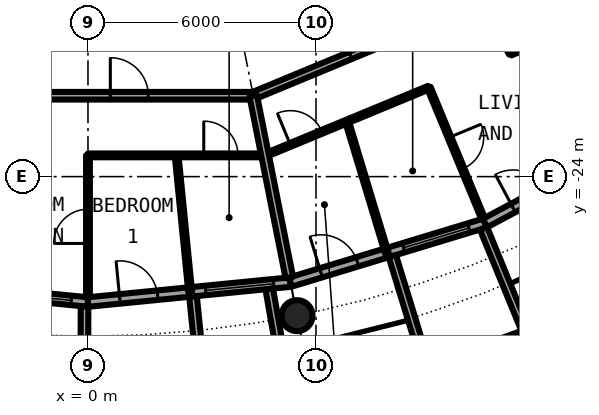
"""IFC4 building model, lengths in metres.
Left out: names, types, materials, properties, quantities, classifications, styles, units other than length and angle.
Written with IfcOpenShell. Run it as: python <this file> out.ifc"""

import sys

from ifc_helpers import new_model, si_unit, direction, frame, frame_2d, origin, origin_2d, place, context, subcontext, project, spatial, rectangle, circle, hollow_circle, extrude, element, fill, save


model = new_model("IFC4")
c1 = context("Model", 3, precision=1e-05, world=origin(), true_north=direction((0.0, 1.0)))
c2 = subcontext(c1, "Body", "Model", "MODEL_VIEW")
j1 = project(units=[si_unit("LENGTHUNIT", "METRE"), si_unit("PLANEANGLEUNIT", "RADIAN")], contexts=[c1])
p1 = place(None, origin())
s1 = spatial("IfcSite", under=j1, at=p1, CompositionType="ELEMENT")
p2 = place(p1, origin())
s2 = spatial("IfcBuilding", under=s1, at=p2, CompositionType="ELEMENT")
p3 = place(p2, frame((0.0, 0.0, 170.75)))
s3 = spatial("IfcBuildingStorey", under=s2, at=p3, CompositionType="ELEMENT", Elevation=170.75)
p4 = place(p3, frame((5.501, -27.658, 0.0), z_axis=(0.0, 0.0, 1.0), x_axis=(1.0, 0.0, 0.0)))
e1 = element("IfcColumn", 1, at=p4, inside=s3, PredefinedType="COLUMN", context=c2, shape_type="SweptSolid", body=[
    extrude(hollow_circle(Radius=0.406, WallThickness=0.04, at=origin_2d()), origin(), (0.0, 0.0, 1.0), 3.05),
])
p5 = place(p3, frame((-5.326, -26.775, 0.0), z_axis=(0.0, 0.0, 1.0), x_axis=(0.995173996315, -0.098126026407, 0.0)))
e2 = element("IfcWall", 2, at=p5, inside=s3, PredefinedType="SOLIDWALL", context=c2, shape_type="SweptSolid", body=[
    extrude(rectangle(XDim=5.352, YDim=0.25, at=frame_2d((2.676, 0.0))), origin(), (0.0, 0.0, 1.0), 2.7),
])
p6 = place(p5, frame((0.841, 0.0, 0.0)))
e3 = element("IfcOpeningElement", 3, at=p6, cuts=e2, PredefinedType="OPENING", context=c2, shape_type="SweptSolid", body=[
    extrude(rectangle(XDim=1.0, YDim=2.2, at=frame_2d((0.5, 1.1))), frame((0.0, 0.135, 0.0), z_axis=(0.0, -1.0, 0.0), x_axis=(1.0, 0.0, 0.0)), (0.0, 0.0, 1.0), 0.27),
])
p7 = place(p5, frame((3.111, 0.0, 0.3)))
e4 = element("IfcOpeningElement", 4, at=p7, cuts=e2, PredefinedType="OPENING", context=c2, shape_type="SweptSolid", body=[
    extrude(rectangle(XDim=1.8, YDim=2.1, at=frame_2d((0.9, 1.05))), frame((0.0, 0.135, 0.0), z_axis=(0.0, -1.0, 0.0), x_axis=(1.0, 0.0, 0.0)), (0.0, 0.0, 1.0), 0.27),
])
p8 = place(p3, frame((-0.09, -27.417, -0.03), z_axis=(0.0, 0.0, 1.0), x_axis=(-0.00347308367, -0.999993968827, 0.0)))
e5 = element("IfcWall", 5, at=p8, inside=s3, PredefinedType="SOLIDWALL", context=c2, shape_type="SweptSolid", body=[
    extrude(rectangle(XDim=2.882, YDim=0.2, at=frame_2d((1.441, 0.0))), origin(), (0.0, 0.0, 1.0), 2.73),
])
p9 = place(p3, frame((0.0, -27.3, 0.0), z_axis=(0.0, 0.0, 1.0), x_axis=(0.995173996315, 0.098126026407, 0.0)))
e6 = element("IfcWall", 6, at=p9, inside=s3, PredefinedType="SOLIDWALL", context=c2, shape_type="SweptSolid", body=[
    extrude(rectangle(XDim=5.352, YDim=0.25, at=frame_2d((2.676, 0.0))), origin(), (0.0, 0.0, 1.0), 2.7),
])
p10 = place(p9, frame((0.841, 0.0, 0.0)))
e7 = element("IfcOpeningElement", 7, at=p10, cuts=e6, PredefinedType="OPENING", context=c2, shape_type="SweptSolid", body=[
    extrude(rectangle(XDim=1.0, YDim=2.2, at=frame_2d((0.5, 1.1))), frame((0.0, 0.135, 0.0), z_axis=(0.0, -1.0, 0.0), x_axis=(1.0, 0.0, 0.0)), (0.0, 0.0, 1.0), 0.27),
])
p11 = place(p9, frame((3.111, 0.0, 0.3)))
e8 = element("IfcOpeningElement", 8, at=p11, cuts=e6, PredefinedType="OPENING", context=c2, shape_type="SweptSolid", body=[
    extrude(rectangle(XDim=1.8, YDim=2.1, at=frame_2d((0.9, 1.05))), frame((0.0, 0.135, 0.0), z_axis=(0.0, -1.0, 0.0), x_axis=(1.0, 0.0, 0.0)), (0.0, 0.0, 1.0), 0.27),
])
p12 = place(p3, frame((2.764, -27.153, -0.03), z_axis=(0.0, 0.0, 1.0), x_axis=(0.101505487237, -0.994834979311, 0.0)))
e9 = element("IfcWall", 9, at=p12, inside=s3, PredefinedType="SOLIDWALL", context=c2, shape_type="SweptSolid", body=[
    extrude(rectangle(XDim=3.007, YDim=0.2, at=frame_2d((1.503, 0.0))), origin(), (0.0, 0.0, 1.0), 2.73),
])
p13 = place(p3, frame((4.769, -26.956, -0.03), z_axis=(0.0, 0.0, 1.0), x_axis=(0.174056778901, -0.984735618183, 0.0)))
e10 = element("IfcWall", 10, at=p13, inside=s3, PredefinedType="SOLIDWALL", context=c2, shape_type="SweptSolid", body=[
    extrude(rectangle(XDim=2.925, YDim=0.2, at=frame_2d((1.462, 0.0))), origin(), (0.0, 0.0, 1.0), 2.73),
])
p14 = place(p3, frame((5.326, -26.775, 0.0), z_axis=(0.0, 0.0, 1.0), x_axis=(0.956965678721, 0.290201119486, 0.0)))
e11 = element("IfcWall", 11, at=p14, inside=s3, PredefinedType="SOLIDWALL", context=c2, shape_type="SweptSolid", body=[
    extrude(rectangle(XDim=5.351, YDim=0.25, at=frame_2d((2.676, 0.0))), origin(), (0.0, 0.0, 1.0), 2.7),
])
p15 = place(p14, frame((0.841, 0.0, 0.0)))
e12 = element("IfcOpeningElement", 12, at=p15, cuts=e11, PredefinedType="OPENING", context=c2, shape_type="SweptSolid", body=[
    extrude(rectangle(XDim=1.0, YDim=2.2, at=frame_2d((0.5, 1.1))), frame((0.0, 0.135, 0.0), z_axis=(0.0, -1.0, 0.0), x_axis=(1.0, 0.0, 0.0)), (0.0, 0.0, 1.0), 0.27),
])
p16 = place(p14, frame((3.111, 0.0, 0.3)))
e13 = element("IfcOpeningElement", 13, at=p16, cuts=e11, PredefinedType="OPENING", context=c2, shape_type="SweptSolid", body=[
    extrude(rectangle(XDim=1.8, YDim=2.1, at=frame_2d((0.9, 1.05))), frame((0.0, 0.135, 0.0), z_axis=(0.0, -1.0, 0.0), x_axis=(1.0, 0.0, 0.0)), (0.0, 0.0, 1.0), 0.27),
])
p17 = place(p3, frame((8.82, -29.093, -0.03), z_axis=(0.0, 0.0, 1.0), x_axis=(0.941461077774, 0.337121697664, 0.0)))
e14 = element("IfcWall", 14, at=p17, inside=s3, PredefinedType="SOLIDWALL", context=c2, shape_type="SweptSolid", body=[
    extrude(rectangle(XDim=2.993, YDim=0.2, at=frame_2d((1.497, 0.0))), origin(), (0.0, 0.0, 1.0), 2.73),
])
p18 = place(p17, frame((0.457, 0.0, 0.33)))
e15 = element("IfcOpeningElement", 15, at=p18, cuts=e14, PredefinedType="OPENING", context=c2, shape_type="SweptSolid", body=[
    extrude(circle(Radius=1.04, at=frame_2d((1.04, 1.04))), frame((0.0, 0.11, 0.0), z_axis=(0.0, -1.0, 0.0), x_axis=(1.0, 0.0, 0.0)), (0.0, 0.0, 1.0), 0.22),
])
p19 = place(p3, frame((8.009, -26.092, -0.03), z_axis=(0.0, 0.0, 1.0), x_axis=(0.293406695073, -0.955987715029, 0.0)))
e16 = element("IfcWall", 16, at=p19, inside=s3, PredefinedType="SOLIDWALL", context=c2, shape_type="SweptSolid", body=[
    extrude(rectangle(XDim=3.006, YDim=0.2, at=frame_2d((1.503, 0.0))), origin(), (0.0, 0.0, 1.0), 2.73),
])
p20 = place(p3, frame((10.409, -25.364, -0.03), z_axis=(0.0, 0.0, 1.0), x_axis=(0.379509886562, -0.925187681501, 0.0)))
e17 = element("IfcWall", 17, at=p20, inside=s3, PredefinedType="SOLIDWALL", context=c2, shape_type="SweptSolid", body=[
    extrude(rectangle(XDim=2.883, YDim=0.2, at=frame_2d((1.441, 0.0))), origin(), (0.0, 0.0, 1.0), 2.73),
])
p21 = place(p3, frame((10.447, -25.222, 0.0), z_axis=(0.0, 0.0, 1.0), x_axis=(0.881915646801, 0.471407246368, 0.0)))
e18 = element("IfcWall", 18, at=p21, inside=s3, PredefinedType="SOLIDWALL", context=c2, shape_type="SweptSolid", body=[
    extrude(rectangle(XDim=5.352, YDim=0.25, at=frame_2d((2.676, 0.0))), origin(), (0.0, 0.0, 1.0), 2.7),
])
p22 = place(p21, frame((0.841, 0.0, 0.0)))
e19 = element("IfcOpeningElement", 19, at=p22, cuts=e18, PredefinedType="OPENING", context=c2, shape_type="SweptSolid", body=[
    extrude(rectangle(XDim=1.0, YDim=2.2, at=frame_2d((0.5, 1.1))), frame((0.0, 0.135, 0.0), z_axis=(0.0, -1.0, 0.0), x_axis=(1.0, 0.0, 0.0)), (0.0, 0.0, 1.0), 0.27),
])
p23 = place(p21, frame((3.111, 0.0, 0.3)))
e20 = element("IfcOpeningElement", 20, at=p23, cuts=e18, PredefinedType="OPENING", context=c2, shape_type="SweptSolid", body=[
    extrude(rectangle(XDim=1.8, YDim=2.1, at=frame_2d((0.9, 1.05))), frame((0.0, 0.135, 0.0), z_axis=(0.0, -1.0, 0.0), x_axis=(1.0, 0.0, 0.0)), (0.0, 0.0, 1.0), 0.27),
])
p24 = place(p3, frame((0.0, -23.441, 0.0), z_axis=(0.0, 0.0, 1.0), x_axis=(1.0, 0.0, 0.0)))
e21 = element("IfcWall", 21, at=p24, inside=s3, PredefinedType="PARTITIONING", context=c2, shape_type="SweptSolid", body=[
    extrude(rectangle(XDim=4.663, YDim=0.1, at=frame_2d((2.332, 0.0))), origin(), (0.0, 0.0, 1.0), 2.7),
])
p25 = place(p24, frame((3.047, 0.0, 0.0)))
e22 = element("IfcOpeningElement", 22, at=p25, cuts=e21, PredefinedType="OPENING", context=c2, shape_type="SweptSolid", body=[
    extrude(rectangle(XDim=0.9, YDim=2.3, at=frame_2d((0.45, 1.15))), frame((0.0, 0.06, 0.0), z_axis=(0.0, -1.0, 0.0), x_axis=(1.0, 0.0, 0.0)), (0.0, 0.0, 1.0), 0.12),
])
p26 = place(p3, frame((4.656, -23.442, 0.0), z_axis=(0.0, 0.0, 1.0), x_axis=(0.923994503548, 0.382405749712, 0.0)))
e23 = element("IfcWall", 23, at=p26, inside=s3, PredefinedType="PARTITIONING", context=c2, shape_type="SweptSolid", body=[
    extrude(rectangle(XDim=4.663, YDim=0.1, at=frame_2d((2.331, 0.0))), origin(), (0.0, 0.0, 1.0), 2.7),
])
p27 = place(p26, frame((0.726, 0.0, 0.0)))
e24 = element("IfcOpeningElement", 24, at=p27, cuts=e23, PredefinedType="OPENING", context=c2, shape_type="SweptSolid", body=[
    extrude(rectangle(XDim=0.9, YDim=2.3, at=frame_2d((0.45, 1.15))), frame((0.0, 0.06, 0.0), z_axis=(0.0, -1.0, 0.0), x_axis=(1.0, 0.0, 0.0)), (0.0, 0.0, 1.0), 0.12),
])
p28 = place(p3, frame((11.124, -20.764, 0.0), z_axis=(0.0, 0.0, 1.0), x_axis=(0.923938991376, 0.382539854414, 0.0)))
e25 = element("IfcWall", 25, at=p28, inside=s3, PredefinedType="PARTITIONING", context=c2, shape_type="SweptSolid", body=[
    extrude(rectangle(XDim=2.331, YDim=0.1, at=frame_2d((1.166, 0.0))), origin(), (0.0, 0.0, 1.0), 2.7),
])
p29 = place(p28, frame((0.716, 0.0, 0.0)))
e26 = element("IfcOpeningElement", 26, at=p29, cuts=e25, PredefinedType="OPENING", context=c2, shape_type="SweptSolid", body=[
    extrude(rectangle(XDim=0.9, YDim=2.3, at=frame_2d((0.45, 1.15))), frame((0.0, 0.06, 0.0), z_axis=(0.0, -1.0, 0.0), x_axis=(1.0, 0.0, 0.0)), (0.0, 0.0, 1.0), 0.12),
])
p30 = place(p3, frame((-4.351, -21.872, 0.0), z_axis=(0.0, 0.0, 1.0), x_axis=(1.0, 0.0, 0.0)))
e27 = element("IfcWall", 27, at=p30, inside=s3, PredefinedType="PARTITIONING", context=c2, shape_type="SweptSolid", body=[
    extrude(rectangle(XDim=8.702, YDim=0.2, at=frame_2d((4.351, 0.0))), origin(), (0.0, 0.0, 1.0), 2.7),
])
p31 = place(p30, frame((4.939, 0.0, 0.0)))
e28 = element("IfcOpeningElement", 28, at=p31, cuts=e27, PredefinedType="OPENING", context=c2, shape_type="SweptSolid", body=[
    extrude(rectangle(XDim=1.0, YDim=2.3, at=frame_2d((0.5, 1.15))), frame((0.0, 0.11, 0.0), z_axis=(0.0, -1.0, 0.0), x_axis=(1.0, 0.0, 0.0)), (0.0, 0.0, 1.0), 0.22),
])
p32 = place(p3, frame((4.351, -21.872, 0.0), z_axis=(0.0, 0.0, 1.0), x_axis=(0.923825356298, 0.382814199136, 0.0)))
e29 = element("IfcWall", 29, at=p32, inside=s3, PredefinedType="PARTITIONING", context=c2, shape_type="SweptSolid", body=[
    extrude(rectangle(XDim=8.704, YDim=0.2, at=frame_2d((4.352, 0.0))), origin(), (0.0, 0.0, 1.0), 2.7),
])
p33 = place(p32, frame((2.763, 0.0, 0.0)))
e30 = element("IfcOpeningElement", 30, at=p33, cuts=e29, PredefinedType="OPENING", context=c2, shape_type="SweptSolid", body=[
    extrude(rectangle(XDim=1.0, YDim=2.3, at=frame_2d((0.5, 1.15))), frame((0.0, 0.11, 0.0), z_axis=(0.0, -1.0, 0.0), x_axis=(1.0, 0.0, 0.0)), (0.0, 0.0, 1.0), 0.22),
])
p34 = place(p3, frame((0.0, -27.175, 0.0), z_axis=(0.0, 0.0, 1.0), x_axis=(0.0, 1.0, 0.0)))
e31 = element("IfcWall", 31, at=p34, inside=s3, PredefinedType="PARTITIONING", context=c2, shape_type="SweptSolid", body=[
    extrude(rectangle(XDim=3.734, YDim=0.1, at=frame_2d((1.867, 0.0))), origin(), (0.0, 0.0, 1.0), 2.7),
])
p35 = place(p34, frame((1.417, 0.0, 0.0)))
e32 = element("IfcOpeningElement", 32, at=p35, cuts=e31, PredefinedType="OPENING", context=c2, shape_type="SweptSolid", body=[
    extrude(rectangle(XDim=0.9, YDim=2.3, at=frame_2d((0.45, 1.15))), frame((0.0, 0.06, 0.0), z_axis=(0.0, -1.0, 0.0), x_axis=(1.0, 0.0, 0.0)), (0.0, 0.0, 1.0), 0.12),
])
p36 = place(p3, frame((2.332, -23.441, 0.0), z_axis=(0.0, 0.0, 1.0), x_axis=(0.099169741095, -0.995070531395, 0.0)))
e33 = element("IfcWall", 33, at=p36, inside=s3, PredefinedType="PARTITIONING", context=c2, shape_type="SweptSolid", body=[
    extrude(rectangle(XDim=3.619, YDim=0.1, at=frame_2d((1.81, 0.0))), origin(), (0.0, 0.0, 1.0), 2.7),
])
p37 = place(p3, frame((4.348, -21.873, 0.0), z_axis=(0.0, 0.0, 1.0), x_axis=(0.194931286287, -0.980816901173, 0.0)))
e34 = element("IfcWall", 34, at=p37, inside=s3, PredefinedType="PARTITIONING", context=c2, shape_type="SweptSolid", body=[
    extrude(rectangle(XDim=4.875, YDim=0.2, at=frame_2d((2.437, 0.0))), origin(), (0.0, 0.0, 1.0), 2.7),
])
p38 = place(p3, frame((6.817, -22.549, 0.0), z_axis=(0.0, 0.0, 1.0), x_axis=(0.289439829793, -0.957196210256, 0.0)))
e35 = element("IfcWall", 35, at=p38, inside=s3, PredefinedType="PARTITIONING", context=c2, shape_type="SweptSolid", body=[
    extrude(rectangle(XDim=3.618, YDim=0.1, at=frame_2d((1.809, 0.0))), origin(), (0.0, 0.0, 1.0), 2.7),
])
p39 = place(p3, frame((8.97, -21.656, 0.0), z_axis=(0.0, 0.0, 1.0), x_axis=(0.382669377748, -0.923885353999, 0.0)))
e36 = element("IfcWall", 36, at=p39, inside=s3, PredefinedType="PARTITIONING", context=c2, shape_type="SweptSolid", body=[
    extrude(rectangle(XDim=3.734, YDim=0.1, at=frame_2d((1.867, 0.0))), origin(), (0.0, 0.0, 1.0), 2.7),
])
p40 = place(p39, frame((1.417, 0.0, 0.0)))
e37 = element("IfcOpeningElement", 37, at=p40, cuts=e36, PredefinedType="OPENING", context=c2, shape_type="SweptSolid", body=[
    extrude(rectangle(XDim=0.9, YDim=2.3, at=frame_2d((0.45, 1.15))), frame((0.0, 0.06, 0.0), z_axis=(0.0, -1.0, 0.0), x_axis=(1.0, 0.0, 0.0)), (0.0, 0.0, 1.0), 0.12),
])
p41 = place(p3, frame((10.38, -19.374, 0.0), z_axis=(0.0, 0.0, 1.0), x_axis=(0.472002235476, -0.881597351236, 0.0)))
e38 = element("IfcWall", 38, at=p41, inside=s3, PredefinedType="PARTITIONING", context=c2, shape_type="SweptSolid", body=[
    extrude(rectangle(XDim=1.577, YDim=0.1, at=frame_2d((0.788, 0.0))), origin(), (0.0, 0.0, 1.0), 2.7),
])
p42 = place(p7, origin())
e39 = element("IfcWindow", 39, at=p42, inside=s3, PartitioningType="SINGLE_PANEL", PredefinedType="WINDOW", context=c2, shape_type="SweptSolid", body=[
    extrude(rectangle(XDim=1.8, YDim=2.1, at=frame_2d((0.9, 1.05))), frame((0.0, 0.03, 0.0), z_axis=(0.0, -1.0, 0.0), x_axis=(1.0, 0.0, 0.0)), (0.0, 0.0, 1.0), 0.06),
])
fill(e4, e39)
p43 = place(p10, origin())
e40 = element("IfcDoor", 40, at=p43, inside=s3, OperationType="SINGLE_SWING_LEFT", PredefinedType="DOOR", context=c2, shape_type="SweptSolid", body=[
    extrude(rectangle(XDim=1.0, YDim=2.2, at=frame_2d((0.5, 1.1))), frame((0.0, 0.025, 0.0), z_axis=(0.0, -1.0, 0.0), x_axis=(1.0, 0.0, 0.0)), (0.0, 0.0, 1.0), 0.05),
])
fill(e7, e40)
p44 = place(p11, origin())
e41 = element("IfcWindow", 41, at=p44, inside=s3, PartitioningType="SINGLE_PANEL", PredefinedType="WINDOW", context=c2, shape_type="SweptSolid", body=[
    extrude(rectangle(XDim=1.8, YDim=2.1, at=frame_2d((0.9, 1.05))), frame((0.0, 0.03, 0.0), z_axis=(0.0, -1.0, 0.0), x_axis=(1.0, 0.0, 0.0)), (0.0, 0.0, 1.0), 0.06),
])
fill(e8, e41)
p45 = place(p15, origin())
e42 = element("IfcDoor", 42, at=p45, inside=s3, OperationType="SINGLE_SWING_LEFT", PredefinedType="DOOR", context=c2, shape_type="SweptSolid", body=[
    extrude(rectangle(XDim=1.0, YDim=2.2, at=frame_2d((0.5, 1.1))), frame((0.0, 0.025, 0.0), z_axis=(0.0, -1.0, 0.0), x_axis=(1.0, 0.0, 0.0)), (0.0, 0.0, 1.0), 0.05),
])
fill(e12, e42)
p46 = place(p16, origin())
e43 = element("IfcWindow", 43, at=p46, inside=s3, PartitioningType="SINGLE_PANEL", PredefinedType="WINDOW", context=c2, shape_type="SweptSolid", body=[
    extrude(rectangle(XDim=1.8, YDim=2.1, at=frame_2d((0.9, 1.05))), frame((0.0, 0.03, 0.0), z_axis=(0.0, -1.0, 0.0), x_axis=(1.0, 0.0, 0.0)), (0.0, 0.0, 1.0), 0.06),
])
fill(e13, e43)
p47 = place(p22, origin())
e44 = element("IfcDoor", 44, at=p47, inside=s3, OperationType="SINGLE_SWING_LEFT", PredefinedType="DOOR", context=c2, shape_type="SweptSolid", body=[
    extrude(rectangle(XDim=1.0, YDim=2.2, at=frame_2d((0.5, 1.1))), frame((0.0, 0.025, 0.0), z_axis=(0.0, -1.0, 0.0), x_axis=(1.0, 0.0, 0.0)), (0.0, 0.0, 1.0), 0.05),
])
fill(e19, e44)
p48 = place(p31, origin())
e45 = element("IfcDoor", 45, at=p48, inside=s3, OperationType="SINGLE_SWING_RIGHT", PredefinedType="DOOR", context=c2, shape_type="SweptSolid", body=[
    extrude(rectangle(XDim=1.0, YDim=2.3, at=frame_2d((0.5, 1.15))), frame((0.0, 0.025, 0.0), z_axis=(0.0, -1.0, 0.0), x_axis=(1.0, 0.0, 0.0)), (0.0, 0.0, 1.0), 0.05),
])
fill(e28, e45)
p49 = place(p35, origin())
e46 = element("IfcDoor", 46, at=p49, inside=s3, OperationType="SINGLE_SWING_RIGHT", PredefinedType="DOOR", context=c2, shape_type="SweptSolid", body=[
    extrude(rectangle(XDim=0.9, YDim=2.3, at=frame_2d((0.45, 1.15))), frame((0.0, 0.025, 0.0), z_axis=(0.0, -1.0, 0.0), x_axis=(1.0, 0.0, 0.0)), (0.0, 0.0, 1.0), 0.05),
])
fill(e32, e46)
p50 = place(p25, origin())
e47 = element("IfcDoor", 47, at=p50, inside=s3, OperationType="SINGLE_SWING_RIGHT", PredefinedType="DOOR", context=c2, shape_type="SweptSolid", body=[
    extrude(rectangle(XDim=0.9, YDim=2.3, at=frame_2d((0.45, 1.15))), frame((0.0, 0.025, 0.0), z_axis=(0.0, -1.0, 0.0), x_axis=(1.0, 0.0, 0.0)), (0.0, 0.0, 1.0), 0.05),
])
fill(e22, e47)
p51 = place(p33, origin())
e48 = element("IfcDoor", 48, at=p51, inside=s3, OperationType="SINGLE_SWING_LEFT", PredefinedType="DOOR", context=c2, shape_type="SweptSolid", body=[
    extrude(rectangle(XDim=1.0, YDim=2.3, at=frame_2d((0.5, 1.15))), frame((0.0, 0.025, 0.0), z_axis=(0.0, -1.0, 0.0), x_axis=(1.0, 0.0, 0.0)), (0.0, 0.0, 1.0), 0.05),
])
fill(e30, e48)
p52 = place(p40, origin())
e49 = element("IfcDoor", 49, at=p52, inside=s3, OperationType="SINGLE_SWING_RIGHT", PredefinedType="DOOR", context=c2, shape_type="SweptSolid", body=[
    extrude(rectangle(XDim=0.9, YDim=2.3, at=frame_2d((0.45, 1.15))), frame((0.0, 0.025, 0.0), z_axis=(0.0, -1.0, 0.0), x_axis=(1.0, 0.0, 0.0)), (0.0, 0.0, 1.0), 0.05),
])
fill(e37, e49)
p53 = place(p27, origin())
e50 = element("IfcDoor", 50, at=p53, inside=s3, OperationType="SINGLE_SWING_LEFT", PredefinedType="DOOR", context=c2, shape_type="SweptSolid", body=[
    extrude(rectangle(XDim=0.9, YDim=2.3, at=frame_2d((0.45, 1.15))), frame((0.0, 0.025, 0.0), z_axis=(0.0, -1.0, 0.0), x_axis=(1.0, 0.0, 0.0)), (0.0, 0.0, 1.0), 0.05),
])
fill(e24, e50)
save(model, sys.argv[1])
